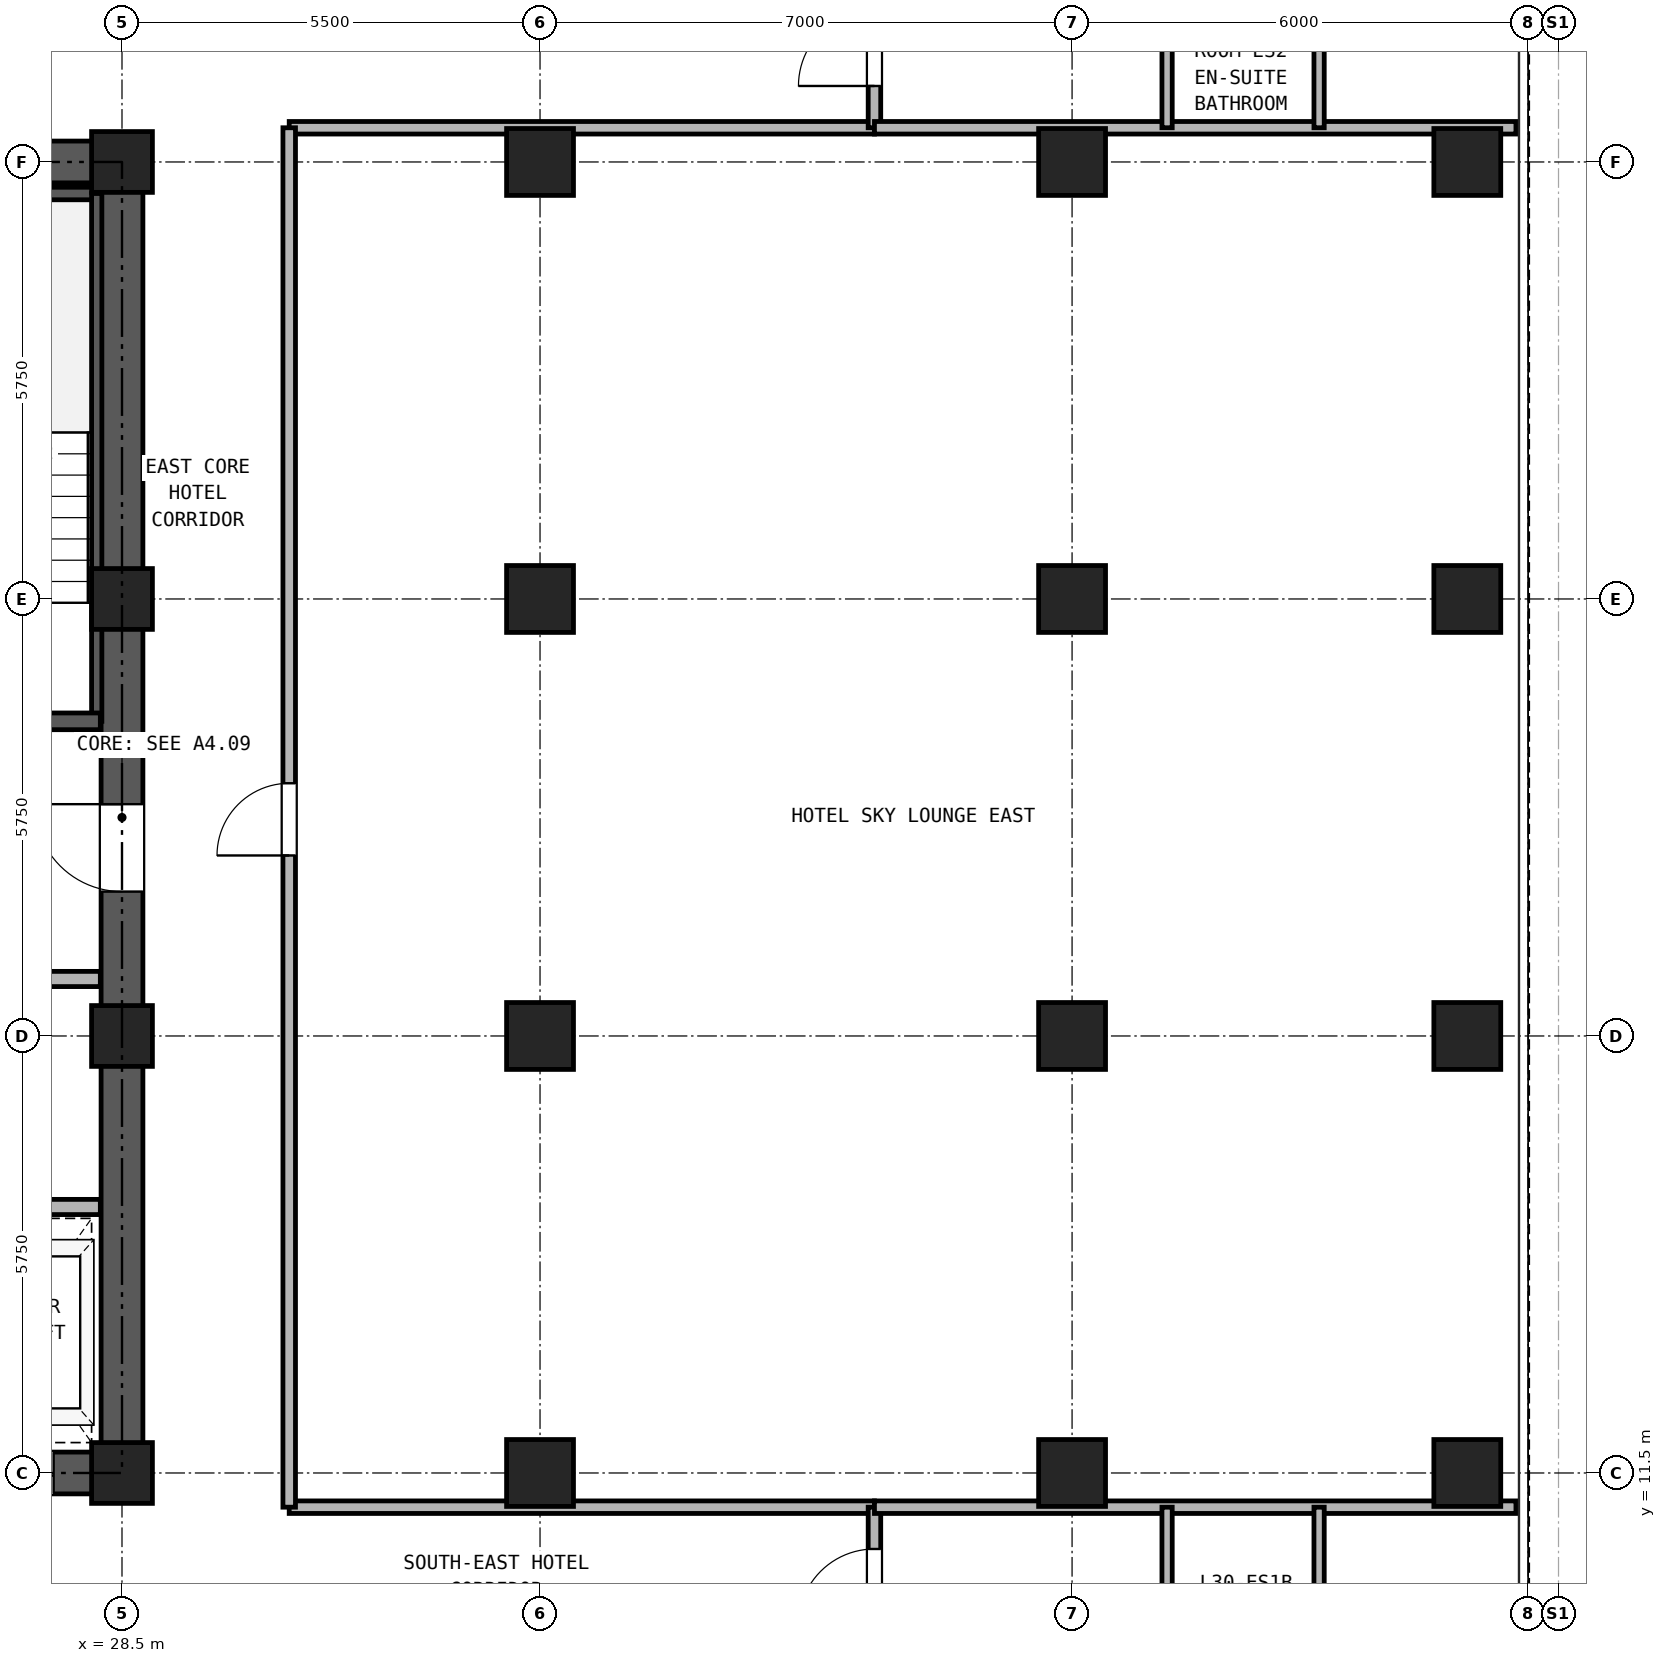
"""IFC4 building model, lengths in metres.
Left out: names, types, materials, properties, quantities, classifications, styles, units other than length and angle.
Written with IfcOpenShell. Run it as: python <this file> out.ifc"""

import sys

from ifc_helpers import new_model, si_unit, direction, frame, frame_2d, origin, origin_2d, place, context, subcontext, project, spatial, rectangle, hollow_rectangle, extrude, source, transform, mapped, element, fill, save


model = new_model("IFC4")
c1 = context("Model", 3, precision=1e-05, world=origin(), true_north=direction((0.0, 1.0)))
c2 = subcontext(c1, "Body", "Model", "MODEL_VIEW")
j1 = project(units=[si_unit("LENGTHUNIT", "METRE"), si_unit("PLANEANGLEUNIT", "RADIAN")], contexts=[c1])
p1 = place(None, origin())
s1 = spatial("IfcSite", under=j1, at=p1, CompositionType="ELEMENT")
p2 = place(p1, origin())
s2 = spatial("IfcBuilding", under=s1, at=p2, CompositionType="ELEMENT")
p3 = place(p2, frame((0.0, 0.0, 111.9)))
s3 = spatial("IfcBuildingStorey", under=s2, at=p3, CompositionType="ELEMENT", Elevation=111.9)
m1 = source(origin(), c2, "Body", "SweptSolid", [
    extrude(hollow_rectangle(XDim=0.88, YDim=0.88, WallThickness=0.05, at=origin_2d()), origin(), (0.0, 0.0, 1.0), 2.95),
])
for number, where, z_axis, x_axis in (
    (1, (46.2, 11.5, 0.0), (0.0, 0.0, 1.0), (1.0, 0.0, 0.0)),
    (2, (46.2, 17.25, 0.0), (0.0, 0.0, 1.0), (1.0, 0.0, 0.0)),
    (3, (46.2, 23.0, 0.0), (0.0, 0.0, 1.0), (1.0, 0.0, 0.0)),
    (4, (46.2, 28.75, 0.0), (0.0, 0.0, 1.0), (1.0, 0.0, 0.0)),
):
    element("IfcColumn", number, at=place(p3, frame(where, z_axis=z_axis, x_axis=x_axis)), inside=s3, PredefinedType="COLUMN", context=c2, shape_type="MappedRepresentation", body=[
        mapped(m1, transform((0.0, 0.0, 0.0), x_axis=(1.0, 0.0, 0.0), y_axis=(0.0, 1.0, 0.0), z_axis=(0.0, 0.0, 1.0), scale=1.0)),
    ])
m2 = source(origin(), c2, "Body", "SweptSolid", [
    extrude(hollow_rectangle(XDim=0.8, YDim=0.8, WallThickness=0.045, at=origin_2d()), origin(), (0.0, 0.0, 1.0), 2.95),
])
for number, where, z_axis, x_axis in (
    (5, (28.5, 11.5, 0.0), (0.0, 0.0, 1.0), (1.0, 0.0, 0.0)),
    (6, (28.5, 17.25, 0.0), (0.0, 0.0, 1.0), (1.0, 0.0, 0.0)),
    (7, (28.5, 23.0, 0.0), (0.0, 0.0, 1.0), (1.0, 0.0, 0.0)),
    (8, (28.5, 28.75, 0.0), (0.0, 0.0, 1.0), (1.0, 0.0, 0.0)),
):
    element("IfcColumn", number, at=place(p3, frame(where, z_axis=z_axis, x_axis=x_axis)), inside=s3, PredefinedType="COLUMN", context=c2, shape_type="MappedRepresentation", body=[
        mapped(m2, transform((0.0, 0.0, 0.0), x_axis=(1.0, 0.0, 0.0), y_axis=(0.0, 1.0, 0.0), z_axis=(0.0, 0.0, 1.0), scale=1.0)),
    ])
for number, where, z_axis, x_axis in (
    (9, (34.0, 11.5, 0.0), (0.0, 0.0, 1.0), (1.0, 0.0, 0.0)),
    (10, (34.0, 17.25, 0.0), (0.0, 0.0, 1.0), (1.0, 0.0, 0.0)),
    (11, (34.0, 23.0, 0.0), (0.0, 0.0, 1.0), (1.0, 0.0, 0.0)),
    (12, (34.0, 28.75, 0.0), (0.0, 0.0, 1.0), (1.0, 0.0, 0.0)),
    (13, (41.0, 11.5, 0.0), (0.0, 0.0, 1.0), (1.0, 0.0, 0.0)),
    (14, (41.0, 17.25, 0.0), (0.0, 0.0, 1.0), (1.0, 0.0, 0.0)),
    (15, (41.0, 23.0, 0.0), (0.0, 0.0, 1.0), (1.0, 0.0, 0.0)),
    (16, (41.0, 28.75, 0.0), (0.0, 0.0, 1.0), (1.0, 0.0, 0.0)),
):
    element("IfcColumn", number, at=place(p3, frame(where, z_axis=z_axis, x_axis=x_axis)), inside=s3, PredefinedType="COLUMN", context=c2, shape_type="MappedRepresentation", body=[
        mapped(m1, transform((0.0, 0.0, 0.0), x_axis=(1.0, 0.0, 0.0), y_axis=(0.0, 1.0, 0.0), z_axis=(0.0, 0.0, 1.0), scale=1.0)),
    ])
p4 = place(p3, frame((18.225, 11.5, 0.0), z_axis=(0.0, 0.0, 1.0), x_axis=(1.0, 0.0, 0.0)))
e17 = element("IfcWall", 17, at=p4, inside=s3, PredefinedType="SHEAR", context=c2, shape_type="SweptSolid", body=[
    extrude(rectangle(XDim=10.55, YDim=0.55, at=frame_2d((5.275, 0.0))), origin(), (0.0, 0.0, 1.0), 2.95),
])
p5 = place(p4, frame((2.375, 0.0, 0.0)))
e18 = element("IfcOpeningElement", 18, at=p5, cuts=e17, PredefinedType="OPENING", context=c2, shape_type="SweptSolid", body=[
    extrude(rectangle(XDim=0.95, YDim=2.15, at=frame_2d((0.475, 1.075))), frame((0.0, 0.285, 0.0), z_axis=(0.0, -1.0, 0.0), x_axis=(1.0, 0.0, 0.0)), (0.0, 0.0, 1.0), 0.57),
])
p6 = place(p4, frame((5.875, 0.0, 0.0)))
e19 = element("IfcOpeningElement", 19, at=p6, cuts=e17, PredefinedType="OPENING", context=c2, shape_type="SweptSolid", body=[
    extrude(rectangle(XDim=1.1, YDim=2.25, at=frame_2d((0.55, 1.125))), frame((0.0, 0.285, 0.0), z_axis=(0.0, -1.0, 0.0), x_axis=(1.0, 0.0, 0.0)), (0.0, 0.0, 1.0), 0.57),
])
p7 = place(p4, frame((8.275, 0.0, 0.0)))
e20 = element("IfcOpeningElement", 20, at=p7, cuts=e17, PredefinedType="OPENING", context=c2, shape_type="SweptSolid", body=[
    extrude(rectangle(XDim=1.1, YDim=2.25, at=frame_2d((0.55, 1.125))), frame((0.0, 0.285, 0.0), z_axis=(0.0, -1.0, 0.0), x_axis=(1.0, 0.0, 0.0)), (0.0, 0.0, 1.0), 0.57),
])
p8 = place(p3, frame((18.225, 28.75, 0.0), z_axis=(0.0, 0.0, 1.0), x_axis=(1.0, 0.0, 0.0)))
e21 = element("IfcWall", 21, at=p8, inside=s3, PredefinedType="SHEAR", context=c2, shape_type="SweptSolid", body=[
    extrude(rectangle(XDim=10.55, YDim=0.55, at=frame_2d((5.275, 0.0))), origin(), (0.0, 0.0, 1.0), 2.95),
])
p9 = place(p8, frame((4.155, 0.0, 0.0)))
e22 = element("IfcOpeningElement", 22, at=p9, cuts=e21, PredefinedType="OPENING", context=c2, shape_type="SweptSolid", body=[
    extrude(rectangle(XDim=0.9, YDim=2.05, at=frame_2d((0.45, 1.025))), frame((0.0, 0.285, 0.0), z_axis=(0.0, -1.0, 0.0), x_axis=(1.0, 0.0, 0.0)), (0.0, 0.0, 1.0), 0.57),
])
p10 = place(p8, frame((5.695, 0.0, 0.0)))
e23 = element("IfcOpeningElement", 23, at=p10, cuts=e21, PredefinedType="OPENING", context=c2, shape_type="SweptSolid", body=[
    extrude(rectangle(XDim=0.9, YDim=2.05, at=frame_2d((0.45, 1.025))), frame((0.0, 0.285, 0.0), z_axis=(0.0, -1.0, 0.0), x_axis=(1.0, 0.0, 0.0)), (0.0, 0.0, 1.0), 0.57),
])
p11 = place(p3, frame((28.5, 11.775, 0.0), z_axis=(0.0, 0.0, 1.0), x_axis=(0.0, 1.0, 0.0)))
e24 = element("IfcWall", 24, at=p11, inside=s3, PredefinedType="SHEAR", context=c2, shape_type="SweptSolid", body=[
    extrude(rectangle(XDim=16.7, YDim=0.55, at=frame_2d((8.35, 0.0))), origin(), (0.0, 0.0, 1.0), 2.95),
])
p12 = place(p11, frame((7.375, 0.0, 0.0)))
e25 = element("IfcOpeningElement", 25, at=p12, cuts=e24, PredefinedType="OPENING", context=c2, shape_type="SweptSolid", body=[
    extrude(rectangle(XDim=1.15, YDim=2.2, at=frame_2d((0.575, 1.1))), frame((0.0, 0.285, 0.0), z_axis=(0.0, -1.0, 0.0), x_axis=(1.0, 0.0, 0.0)), (0.0, 0.0, 1.0), 0.57),
])
p13 = place(p3, frame((25.13, 28.335, 0.0), z_axis=(0.0, 0.0, 1.0), x_axis=(1.0, 0.0, 0.0)))
e26 = element("IfcWall", 26, at=p13, inside=s3, PredefinedType="PARTITIONING", context=c2, shape_type="SweptSolid", body=[
    extrude(rectangle(XDim=3.085, YDim=0.165, at=frame_2d((1.542, 0.0))), origin(), (0.0, 0.0, 1.0), 2.95),
])
p14 = place(p3, frame((28.167, 21.39, 0.0), z_axis=(0.0, 0.0, 1.0), x_axis=(0.0, 1.0, 0.0)))
e27 = element("IfcWall", 27, at=p14, inside=s3, PredefinedType="PARTITIONING", context=c2, shape_type="SweptSolid", body=[
    extrude(rectangle(XDim=6.945, YDim=0.135, at=frame_2d((3.473, 0.0))), origin(), (0.0, 0.0, 1.0), 2.95),
])
p15 = place(p3, frame((25.13, 21.39, 0.0), z_axis=(0.0, 0.0, 1.0), x_axis=(1.0, 0.0, 0.0)))
e28 = element("IfcWall", 28, at=p15, inside=s3, PredefinedType="SOLIDWALL", context=c2, shape_type="SweptSolid", body=[
    extrude(rectangle(XDim=3.085, YDim=0.22, at=frame_2d((1.542, 0.0))), origin(), (0.0, 0.0, 1.0), 2.95),
])
p16 = place(p15, frame((0.92, 0.0, 0.0)))
e29 = element("IfcOpeningElement", 29, at=p16, cuts=e28, PredefinedType="OPENING", context=c2, shape_type="SweptSolid", body=[
    extrude(rectangle(XDim=1.15, YDim=2.2, at=frame_2d((0.575, 1.1))), frame((0.0, 0.12, 0.0), z_axis=(0.0, -1.0, 0.0), x_axis=(1.0, 0.0, 0.0)), (0.0, 0.0, 1.0), 0.24),
])
p17 = place(p3, frame((18.785, 18.0, 0.0), z_axis=(0.0, 0.0, 1.0), x_axis=(1.0, 0.0, 0.0)))
e30 = element("IfcWall", 30, at=p17, inside=s3, PredefinedType="PARTITIONING", context=c2, shape_type="SweptSolid", body=[
    extrude(rectangle(XDim=9.43, YDim=0.2, at=frame_2d((4.715, 0.0))), origin(), (0.0, 0.0, 1.0), 2.95),
])
p18 = place(p17, frame((0.465, 0.0, 0.0)))
e31 = element("IfcOpeningElement", 31, at=p18, cuts=e30, PredefinedType="OPENING", context=c2, shape_type="SweptSolid", body=[
    extrude(rectangle(XDim=1.3, YDim=2.3, at=frame_2d((0.65, 1.15))), frame((0.0, 0.11, 0.0), z_axis=(0.0, -1.0, 0.0), x_axis=(1.0, 0.0, 0.0)), (0.0, 0.0, 1.0), 0.22),
])
p19 = place(p17, frame((2.565, 0.0, 0.0)))
e32 = element("IfcOpeningElement", 32, at=p19, cuts=e30, PredefinedType="OPENING", context=c2, shape_type="SweptSolid", body=[
    extrude(rectangle(XDim=1.3, YDim=2.3, at=frame_2d((0.65, 1.15))), frame((0.0, 0.11, 0.0), z_axis=(0.0, -1.0, 0.0), x_axis=(1.0, 0.0, 0.0)), (0.0, 0.0, 1.0), 0.22),
])
p20 = place(p17, frame((7.065, 0.0, 0.0)))
e33 = element("IfcOpeningElement", 33, at=p20, cuts=e30, PredefinedType="OPENING", context=c2, shape_type="SweptSolid", body=[
    extrude(rectangle(XDim=1.0, YDim=2.15, at=frame_2d((0.5, 1.075))), frame((0.0, 0.11, 0.0), z_axis=(0.0, -1.0, 0.0), x_axis=(1.0, 0.0, 0.0)), (0.0, 0.0, 1.0), 0.22),
])
p21 = place(p3, frame((18.785, 15.0, 0.0), z_axis=(0.0, 0.0, 1.0), x_axis=(1.0, 0.0, 0.0)))
e34 = element("IfcWall", 34, at=p21, inside=s3, PredefinedType="PARTITIONING", context=c2, shape_type="SweptSolid", body=[
    extrude(rectangle(XDim=9.43, YDim=0.2, at=frame_2d((4.715, 0.0))), origin(), (0.0, 0.0, 1.0), 2.95),
])
for number, where, z_axis, x_axis in (
    (35, (30.7, 11.05, 0.0), (0.0, 0.0, 1.0), (1.0, 0.0, 0.0)),
    (36, (30.7, 29.2, 0.0), (0.0, 0.0, 1.0), (1.0, 0.0, 0.0)),
):
    element("IfcWall", number, at=place(p3, frame(where, z_axis=z_axis, x_axis=x_axis)), inside=s3, PredefinedType="PARTITIONING", context=c2, shape_type="SweptSolid", body=[
        extrude(rectangle(XDim=7.7, YDim=0.165, at=frame_2d((3.85, 0.0))), origin(), (0.0, 0.0, 1.0), 2.95),
    ])
p22 = place(p3, frame((30.7, 11.05, 0.0), z_axis=(0.0, 0.0, 1.0), x_axis=(0.0, 1.0, 0.0)))
e37 = element("IfcWall", 37, at=p22, inside=s3, PredefinedType="PARTITIONING", context=c2, shape_type="SweptSolid", body=[
    extrude(rectangle(XDim=18.15, YDim=0.165, at=frame_2d((9.075, 0.0))), origin(), (0.0, 0.0, 1.0), 2.95),
])
p23 = place(p22, frame((8.575, 0.0, 0.0)))
e38 = element("IfcOpeningElement", 38, at=p23, cuts=e37, PredefinedType="OPENING", context=c2, shape_type="SweptSolid", body=[
    extrude(rectangle(XDim=0.95, YDim=2.15, at=frame_2d((0.475, 1.075))), frame((0.0, 0.093, 0.0), z_axis=(0.0, -1.0, 0.0), x_axis=(1.0, 0.0, 0.0)), (0.0, 0.0, 1.0), 0.185),
])
p24 = place(p3, frame((38.4, 0.16, 0.0), z_axis=(0.0, 0.0, 1.0), x_axis=(0.0, 1.0, 0.0)))
e39 = element("IfcWall", 39, at=p24, inside=s3, PredefinedType="PARTITIONING", context=c2, shape_type="SweptSolid", body=[
    extrude(rectangle(XDim=10.89, YDim=0.165, at=frame_2d((5.445, 0.0))), origin(), (0.0, 0.0, 1.0), 2.95),
])
p25 = place(p24, frame((9.34, 0.0, 0.0)))
e40 = element("IfcOpeningElement", 40, at=p25, cuts=e39, PredefinedType="OPENING", context=c2, shape_type="SweptSolid", body=[
    extrude(rectangle(XDim=1.0, YDim=2.15, at=frame_2d((0.5, 1.075))), frame((0.0, 0.093, 0.0), z_axis=(0.0, -1.0, 0.0), x_axis=(1.0, 0.0, 0.0)), (0.0, 0.0, 1.0), 0.185),
])
p26 = place(p3, frame((38.4, 29.2, 0.0), z_axis=(0.0, 0.0, 1.0), x_axis=(0.0, 1.0, 0.0)))
e41 = element("IfcWall", 41, at=p26, inside=s3, PredefinedType="PARTITIONING", context=c2, shape_type="SweptSolid", body=[
    extrude(rectangle(XDim=5.94, YDim=0.165, at=frame_2d((2.97, 0.0))), origin(), (0.0, 0.0, 1.0), 2.95),
])
p27 = place(p26, frame((0.55, 0.0, 0.0)))
e42 = element("IfcOpeningElement", 42, at=p27, cuts=e41, PredefinedType="OPENING", context=c2, shape_type="SweptSolid", body=[
    extrude(rectangle(XDim=1.0, YDim=2.15, at=frame_2d((0.5, 1.075))), frame((0.0, 0.093, 0.0), z_axis=(0.0, -1.0, 0.0), x_axis=(1.0, 0.0, 0.0)), (0.0, 0.0, 1.0), 0.185),
])
for number, where, z_axis, x_axis in (
    (43, (38.4, 11.05, 0.0), (0.0, 0.0, 1.0), (1.0, 0.0, 0.0)),
    (44, (38.4, 29.2, 0.0), (0.0, 0.0, 1.0), (1.0, 0.0, 0.0)),
):
    element("IfcWall", number, at=place(p3, frame(where, z_axis=z_axis, x_axis=x_axis)), inside=s3, PredefinedType="PARTITIONING", context=c2, shape_type="SweptSolid", body=[
        extrude(rectangle(XDim=8.44, YDim=0.165, at=frame_2d((4.22, 0.0))), origin(), (0.0, 0.0, 1.0), 2.95),
    ])
for number, where, z_axis, x_axis in (
    (45, (42.25, 8.95, 0.0), (0.0, 0.0, 1.0), (0.0, 1.0, 0.0)),
    (46, (44.25, 8.95, 0.0), (0.0, 0.0, 1.0), (0.0, 1.0, 0.0)),
    (47, (42.25, 29.2, 0.0), (0.0, 0.0, 1.0), (0.0, 1.0, 0.0)),
    (48, (44.25, 29.2, 0.0), (0.0, 0.0, 1.0), (0.0, 1.0, 0.0)),
):
    element("IfcWall", number, at=place(p3, frame(where, z_axis=z_axis, x_axis=x_axis)), inside=s3, PredefinedType="PARTITIONING", context=c2, shape_type="SweptSolid", body=[
        extrude(rectangle(XDim=2.1, YDim=0.135, at=frame_2d((1.05, 0.0))), origin(), (0.0, 0.0, 1.0), 2.95),
    ])
p28 = place(p12, origin())
e49 = element("IfcDoor", 49, at=p28, inside=s3, OperationType="SINGLE_SWING_RIGHT", PredefinedType="DOOR", context=c2, shape_type="SweptSolid", body=[
    extrude(rectangle(XDim=1.15, YDim=2.2, at=frame_2d((0.575, 1.1))), frame((0.0, 0.025, 0.0), z_axis=(0.0, -1.0, 0.0), x_axis=(1.0, 0.0, 0.0)), (0.0, 0.0, 1.0), 0.05),
])
fill(e25, e49)
p29 = place(p7, frame((1.1, 0.0, 0.0), z_axis=(0.0, 0.0, 1.0), x_axis=(-1.0, 0.0, 0.0)))
e50 = element("IfcDoor", 50, at=p29, inside=s3, OperationType="DOUBLE_DOOR_SLIDING", PredefinedType="DOOR", context=c2, shape_type="SweptSolid", body=[
    extrude(rectangle(XDim=1.1, YDim=2.25, at=frame_2d((0.55, 1.125))), frame((0.0, 0.025, 0.0), z_axis=(0.0, -1.0, 0.0), x_axis=(1.0, 0.0, 0.0)), (0.0, 0.0, 1.0), 0.05),
])
fill(e20, e50)
p30 = place(p25, frame((1.0, 0.0, 0.0), z_axis=(0.0, 0.0, 1.0), x_axis=(-1.0, 0.0, 0.0)))
e51 = element("IfcDoor", 51, at=p30, inside=s3, OperationType="SINGLE_SWING_LEFT", PredefinedType="DOOR", context=c2, shape_type="SweptSolid", body=[
    extrude(rectangle(XDim=1.0, YDim=2.15, at=frame_2d((0.5, 1.075))), frame((0.0, 0.025, 0.0), z_axis=(0.0, -1.0, 0.0), x_axis=(1.0, 0.0, 0.0)), (0.0, 0.0, 1.0), 0.05),
])
fill(e40, e51)
p31 = place(p27, frame((1.0, 0.0, 0.0), z_axis=(0.0, 0.0, 1.0), x_axis=(-1.0, 0.0, 0.0)))
e52 = element("IfcDoor", 52, at=p31, inside=s3, OperationType="SINGLE_SWING_LEFT", PredefinedType="DOOR", context=c2, shape_type="SweptSolid", body=[
    extrude(rectangle(XDim=1.0, YDim=2.15, at=frame_2d((0.5, 1.075))), frame((0.0, 0.025, 0.0), z_axis=(0.0, -1.0, 0.0), x_axis=(1.0, 0.0, 0.0)), (0.0, 0.0, 1.0), 0.05),
])
fill(e42, e52)
p32 = place(p23, origin())
e53 = element("IfcDoor", 53, at=p32, inside=s3, OperationType="SINGLE_SWING_LEFT", PredefinedType="DOOR", context=c2, shape_type="SweptSolid", body=[
    extrude(rectangle(XDim=0.95, YDim=2.15, at=frame_2d((0.475, 1.075))), frame((0.0, 0.025, 0.0), z_axis=(0.0, -1.0, 0.0), x_axis=(1.0, 0.0, 0.0)), (0.0, 0.0, 1.0), 0.05),
])
fill(e38, e53)
save(model, sys.argv[1])
